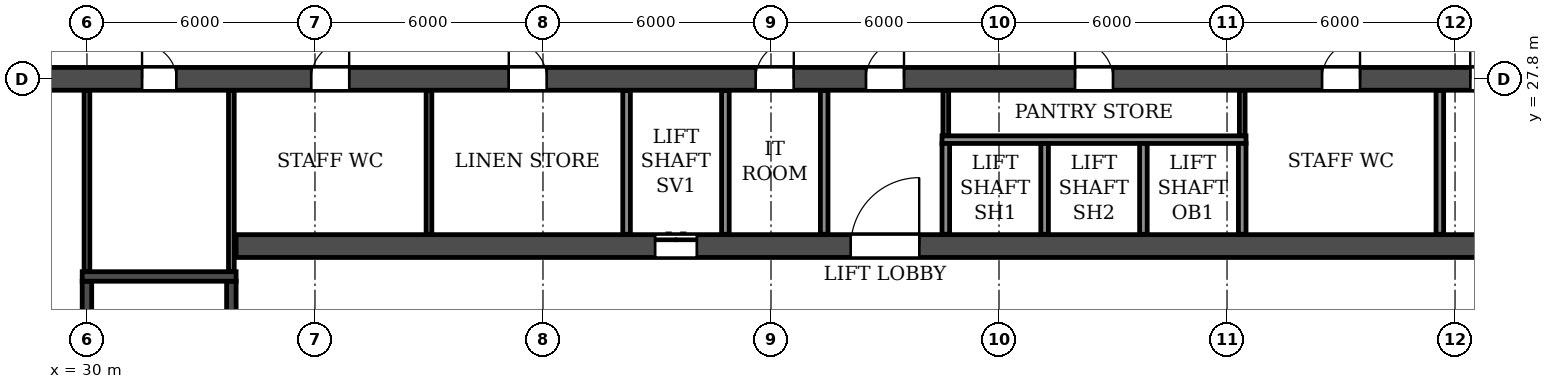
"""IFC4 building model, lengths in metres.
Left out: names, types, materials, properties, quantities, classifications, styles, units other than length and angle.
Written with IfcOpenShell. Run it as: python <this file> out.ifc"""

import sys

from ifc_helpers import new_model, si_unit, direction, frame, frame_2d, origin, place, context, subcontext, project, spatial, rectangle, extrude, element, fill, save


model = new_model("IFC4")
c1 = context("Model", 3, precision=1e-05, world=origin(), true_north=direction((0.0, 1.0)))
c2 = subcontext(c1, "Body", "Model", "MODEL_VIEW")
j1 = project(units=[si_unit("LENGTHUNIT", "METRE"), si_unit("PLANEANGLEUNIT", "RADIAN")], contexts=[c1])
p1 = place(None, origin())
s1 = spatial("IfcSite", under=j1, at=p1, CompositionType="ELEMENT")
p2 = place(p1, origin())
s2 = spatial("IfcBuilding", under=s1, at=p2, CompositionType="ELEMENT")
p3 = place(p2, frame((0.0, 0.0, 63.0)))
s3 = spatial("IfcBuildingStorey", under=s2, at=p3, CompositionType="ELEMENT", Elevation=63.0)
p4 = place(p3, frame((8.6, 27.8, 0.0), z_axis=(0.0, 0.0, 1.0), x_axis=(1.0, 0.0, 0.0)))
e1 = element("IfcWall", 1, at=p4, inside=s3, PredefinedType="SOLIDWALL", context=c2, shape_type="SweptSolid", body=[
    extrude(rectangle(XDim=84.8, YDim=0.6, at=frame_2d((42.4, 0.0))), origin(), (0.0, 0.0, 1.0), 2.95),
])
p5 = place(p4, frame((1.2, 0.0, 0.0)))
e2 = element("IfcOpeningElement", 2, at=p5, cuts=e1, PredefinedType="OPENING", context=c2, shape_type="SweptSolid", body=[
    extrude(rectangle(XDim=1.0, YDim=2.1, at=frame_2d((0.5, 1.05))), frame((0.0, 0.31, 0.0), z_axis=(0.0, -1.0, 0.0), x_axis=(1.0, 0.0, 0.0)), (0.0, 0.0, 1.0), 0.62),
])
p6 = place(p4, frame((5.9, 0.0, 0.0)))
e3 = element("IfcOpeningElement", 3, at=p6, cuts=e1, PredefinedType="OPENING", context=c2, shape_type="SweptSolid", body=[
    extrude(rectangle(XDim=1.0, YDim=2.1, at=frame_2d((0.5, 1.05))), frame((0.0, 0.31, 0.0), z_axis=(0.0, -1.0, 0.0), x_axis=(1.0, 0.0, 0.0)), (0.0, 0.0, 1.0), 0.62),
])
p7 = place(p4, frame((10.3, 0.0, 0.0)))
e4 = element("IfcOpeningElement", 4, at=p7, cuts=e1, PredefinedType="OPENING", context=c2, shape_type="SweptSolid", body=[
    extrude(rectangle(XDim=1.0, YDim=2.1, at=frame_2d((0.5, 1.05))), frame((0.0, 0.31, 0.0), z_axis=(0.0, -1.0, 0.0), x_axis=(1.0, 0.0, 0.0)), (0.0, 0.0, 1.0), 0.62),
])
p8 = place(p4, frame((13.65, 0.0, 0.0)))
e5 = element("IfcOpeningElement", 5, at=p8, cuts=e1, PredefinedType="OPENING", context=c2, shape_type="SweptSolid", body=[
    extrude(rectangle(XDim=0.9, YDim=2.1, at=frame_2d((0.45, 1.05))), frame((0.0, 0.31, 0.0), z_axis=(0.0, -1.0, 0.0), x_axis=(1.0, 0.0, 0.0)), (0.0, 0.0, 1.0), 0.62),
])
p9 = place(p4, frame((22.85, 0.0, 0.0)))
e6 = element("IfcOpeningElement", 6, at=p9, cuts=e1, PredefinedType="OPENING", context=c2, shape_type="SweptSolid", body=[
    extrude(rectangle(XDim=0.9, YDim=2.1, at=frame_2d((0.45, 1.05))), frame((0.0, 0.31, 0.0), z_axis=(0.0, -1.0, 0.0), x_axis=(1.0, 0.0, 0.0)), (0.0, 0.0, 1.0), 0.62),
])
p10 = place(p4, frame((27.3, 0.0, 0.0)))
e7 = element("IfcOpeningElement", 7, at=p10, cuts=e1, PredefinedType="OPENING", context=c2, shape_type="SweptSolid", body=[
    extrude(rectangle(XDim=1.0, YDim=2.1, at=frame_2d((0.5, 1.05))), frame((0.0, 0.31, 0.0), z_axis=(0.0, -1.0, 0.0), x_axis=(1.0, 0.0, 0.0)), (0.0, 0.0, 1.0), 0.62),
])
p11 = place(p4, frame((32.5, 0.0, 0.0)))
e8 = element("IfcOpeningElement", 8, at=p11, cuts=e1, PredefinedType="OPENING", context=c2, shape_type="SweptSolid", body=[
    extrude(rectangle(XDim=1.0, YDim=2.1, at=frame_2d((0.5, 1.05))), frame((0.0, 0.31, 0.0), z_axis=(0.0, -1.0, 0.0), x_axis=(1.0, 0.0, 0.0)), (0.0, 0.0, 1.0), 0.62),
])
p12 = place(p4, frame((39.0, 0.0, 0.0)))
e9 = element("IfcOpeningElement", 9, at=p12, cuts=e1, PredefinedType="OPENING", context=c2, shape_type="SweptSolid", body=[
    extrude(rectangle(XDim=1.0, YDim=2.1, at=frame_2d((0.5, 1.05))), frame((0.0, 0.31, 0.0), z_axis=(0.0, -1.0, 0.0), x_axis=(1.0, 0.0, 0.0)), (0.0, 0.0, 1.0), 0.62),
])
p13 = place(p4, frame((41.9, 0.0, 0.0)))
e10 = element("IfcOpeningElement", 10, at=p13, cuts=e1, PredefinedType="OPENING", context=c2, shape_type="SweptSolid", body=[
    extrude(rectangle(XDim=1.0, YDim=2.1, at=frame_2d((0.5, 1.05))), frame((0.0, 0.31, 0.0), z_axis=(0.0, -1.0, 0.0), x_axis=(1.0, 0.0, 0.0)), (0.0, 0.0, 1.0), 0.62),
])
p14 = place(p4, frame((47.4, 0.0, 0.0)))
e11 = element("IfcOpeningElement", 11, at=p14, cuts=e1, PredefinedType="OPENING", context=c2, shape_type="SweptSolid", body=[
    extrude(rectangle(XDim=1.0, YDim=2.1, at=frame_2d((0.5, 1.05))), frame((0.0, 0.31, 0.0), z_axis=(0.0, -1.0, 0.0), x_axis=(1.0, 0.0, 0.0)), (0.0, 0.0, 1.0), 0.62),
])
p15 = place(p4, frame((53.9, 0.0, 0.0)))
e12 = element("IfcOpeningElement", 12, at=p15, cuts=e1, PredefinedType="OPENING", context=c2, shape_type="SweptSolid", body=[
    extrude(rectangle(XDim=1.0, YDim=2.1, at=frame_2d((0.5, 1.05))), frame((0.0, 0.31, 0.0), z_axis=(0.0, -1.0, 0.0), x_axis=(1.0, 0.0, 0.0)), (0.0, 0.0, 1.0), 0.62),
])
p16 = place(p4, frame((57.8, 0.0, 0.0)))
e13 = element("IfcOpeningElement", 13, at=p16, cuts=e1, PredefinedType="OPENING", context=c2, shape_type="SweptSolid", body=[
    extrude(rectangle(XDim=1.0, YDim=2.1, at=frame_2d((0.5, 1.05))), frame((0.0, 0.31, 0.0), z_axis=(0.0, -1.0, 0.0), x_axis=(1.0, 0.0, 0.0)), (0.0, 0.0, 1.0), 0.62),
])
p17 = place(p4, frame((61.05, 0.0, 0.0)))
e14 = element("IfcOpeningElement", 14, at=p17, cuts=e1, PredefinedType="OPENING", context=c2, shape_type="SweptSolid", body=[
    extrude(rectangle(XDim=0.9, YDim=2.1, at=frame_2d((0.45, 1.05))), frame((0.0, 0.31, 0.0), z_axis=(0.0, -1.0, 0.0), x_axis=(1.0, 0.0, 0.0)), (0.0, 0.0, 1.0), 0.62),
])
p18 = place(p4, frame((70.25, 0.0, 0.0)))
e15 = element("IfcOpeningElement", 15, at=p18, cuts=e1, PredefinedType="OPENING", context=c2, shape_type="SweptSolid", body=[
    extrude(rectangle(XDim=0.9, YDim=2.1, at=frame_2d((0.45, 1.05))), frame((0.0, 0.31, 0.0), z_axis=(0.0, -1.0, 0.0), x_axis=(1.0, 0.0, 0.0)), (0.0, 0.0, 1.0), 0.62),
])
p19 = place(p4, frame((73.5, 0.0, 0.0)))
e16 = element("IfcOpeningElement", 16, at=p19, cuts=e1, PredefinedType="OPENING", context=c2, shape_type="SweptSolid", body=[
    extrude(rectangle(XDim=1.0, YDim=2.1, at=frame_2d((0.5, 1.05))), frame((0.0, 0.31, 0.0), z_axis=(0.0, -1.0, 0.0), x_axis=(1.0, 0.0, 0.0)), (0.0, 0.0, 1.0), 0.62),
])
p20 = place(p4, frame((77.75, 0.0, 0.0)))
e17 = element("IfcOpeningElement", 17, at=p20, cuts=e1, PredefinedType="OPENING", context=c2, shape_type="SweptSolid", body=[
    extrude(rectangle(XDim=1.0, YDim=2.1, at=frame_2d((0.5, 1.05))), frame((0.0, 0.31, 0.0), z_axis=(0.0, -1.0, 0.0), x_axis=(1.0, 0.0, 0.0)), (0.0, 0.0, 1.0), 0.62),
])
p21 = place(p4, frame((82.45, 0.0, 0.0)))
e18 = element("IfcOpeningElement", 18, at=p21, cuts=e1, PredefinedType="OPENING", context=c2, shape_type="SweptSolid", body=[
    extrude(rectangle(XDim=1.0, YDim=2.1, at=frame_2d((0.5, 1.05))), frame((0.0, 0.31, 0.0), z_axis=(0.0, -1.0, 0.0), x_axis=(1.0, 0.0, 0.0)), (0.0, 0.0, 1.0), 0.62),
])
p22 = place(p3, frame((33.925, 23.4, 0.0), z_axis=(0.0, 0.0, 1.0), x_axis=(1.0, 0.0, 0.0)))
e19 = element("IfcWall", 19, at=p22, inside=s3, PredefinedType="SOLIDWALL", context=c2, shape_type="SweptSolid", body=[
    extrude(rectangle(XDim=34.15, YDim=0.6, at=frame_2d((17.075, 0.0))), origin(), (0.0, 0.0, 1.0), 2.95),
])
p23 = place(p22, frame((16.175, 0.0, 0.0)))
e20 = element("IfcOpeningElement", 20, at=p23, cuts=e19, PredefinedType="OPENING", context=c2, shape_type="SweptSolid", body=[
    extrude(rectangle(XDim=1.8, YDim=2.1, at=frame_2d((0.9, 1.05))), frame((0.0, 0.31, 0.0), z_axis=(0.0, -1.0, 0.0), x_axis=(1.0, 0.0, 0.0)), (0.0, 0.0, 1.0), 0.62),
])
p24 = place(p22, frame((11.025, 0.0, 0.0)))
e21 = element("IfcOpeningElement", 21, at=p24, cuts=e19, PredefinedType="OPENING", context=c2, shape_type="SweptSolid", body=[
    extrude(rectangle(XDim=1.1, YDim=2.1, at=frame_2d((0.55, 1.05))), frame((0.0, 0.31, 0.0), z_axis=(0.0, -1.0, 0.0), x_axis=(1.0, 0.0, 0.0)), (0.0, 0.0, 1.0), 0.62),
])
p25 = place(p3, frame((30.0, 14.9, 0.0), z_axis=(0.0, 0.0, 1.0), x_axis=(0.0, 1.0, 0.0)))
e22 = element("IfcWall", 22, at=p25, inside=s3, PredefinedType="SOLIDWALL", context=c2, shape_type="SweptSolid", body=[
    extrude(rectangle(XDim=7.575, YDim=0.25, at=frame_2d((3.788, 0.0))), origin(), (0.0, 0.0, 1.0), 2.95),
])
p26 = place(p3, frame((33.8, 14.9, 0.0), z_axis=(0.0, 0.0, 1.0), x_axis=(0.0, 1.0, 0.0)))
e23 = element("IfcWall", 23, at=p26, inside=s3, PredefinedType="SOLIDWALL", context=c2, shape_type="SweptSolid", body=[
    extrude(rectangle(XDim=7.575, YDim=0.25, at=frame_2d((3.788, 0.0))), origin(), (0.0, 0.0, 1.0), 2.95),
])
p27 = place(p26, frame((0.4, 0.0, 0.0)))
e24 = element("IfcOpeningElement", 24, at=p27, cuts=e23, PredefinedType="OPENING", context=c2, shape_type="SweptSolid", body=[
    extrude(rectangle(XDim=1.0, YDim=2.1, at=frame_2d((0.5, 1.05))), frame((0.0, 0.135, 0.0), z_axis=(0.0, -1.0, 0.0), x_axis=(1.0, 0.0, 0.0)), (0.0, 0.0, 1.0), 0.27),
])
p28 = place(p3, frame((29.875, 22.6, 0.0), z_axis=(0.0, 0.0, 1.0), x_axis=(1.0, 0.0, 0.0)))
e25 = element("IfcWall", 25, at=p28, inside=s3, PredefinedType="SOLIDWALL", context=c2, shape_type="SweptSolid", body=[
    extrude(rectangle(XDim=4.05, YDim=0.25, at=frame_2d((2.025, 0.0))), origin(), (0.0, 0.0, 1.0), 2.95),
])
p29 = place(p3, frame((52.6, 26.3, 0.0), z_axis=(0.0, 0.0, 1.0), x_axis=(0.0, 1.0, 0.0)))
e26 = element("IfcWall", 26, at=p29, inside=s3, PredefinedType="PARTITIONING", context=c2, shape_type="SweptSolid", body=[
    extrude(rectangle(XDim=1.19, YDim=0.15, at=frame_2d((0.595, 0.0))), origin(), (0.0, 0.0, 1.0), 2.95),
])
p30 = place(p3, frame((39.0, 23.71, 0.0), z_axis=(0.0, 0.0, 1.0), x_axis=(0.0, 1.0, 0.0)))
e27 = element("IfcWall", 27, at=p30, inside=s3, PredefinedType="PARTITIONING", context=c2, shape_type="SweptSolid", body=[
    extrude(rectangle(XDim=3.78, YDim=0.15, at=frame_2d((1.89, 0.0))), origin(), (0.0, 0.0, 1.0), 2.95),
])
p31 = place(p3, frame((60.4, 26.3, 0.0), z_axis=(0.0, 0.0, 1.0), x_axis=(0.0, 1.0, 0.0)))
e28 = element("IfcWall", 28, at=p31, inside=s3, PredefinedType="PARTITIONING", context=c2, shape_type="SweptSolid", body=[
    extrude(rectangle(XDim=1.19, YDim=0.15, at=frame_2d((0.595, 0.0))), origin(), (0.0, 0.0, 1.0), 2.95),
])
for number, where, z_axis, x_axis in (
    (29, (49.4, 23.71, 0.0), (0.0, 0.0, 1.0), (0.0, 1.0, 0.0)),
    (30, (65.6, 23.71, 0.0), (0.0, 0.0, 1.0), (0.0, 1.0, 0.0)),
):
    element("IfcWall", number, at=place(p3, frame(where, z_axis=z_axis, x_axis=x_axis)), inside=s3, PredefinedType="PARTITIONING", context=c2, shape_type="SweptSolid", body=[
        extrude(rectangle(XDim=3.78, YDim=0.2, at=frame_2d((1.89, 0.0))), origin(), (0.0, 0.0, 1.0), 2.95),
    ])
for number, where, z_axis, x_axis in (
    (31, (30.0, 22.735, 0.0), (0.0, 0.0, 1.0), (0.0, 1.0, 0.0)),
    (32, (33.8, 22.735, 0.0), (0.0, 0.0, 1.0), (0.0, 1.0, 0.0)),
):
    element("IfcWall", number, at=place(p3, frame(where, z_axis=z_axis, x_axis=x_axis)), inside=s3, PredefinedType="PARTITIONING", context=c2, shape_type="SweptSolid", body=[
        extrude(rectangle(XDim=4.755, YDim=0.15, at=frame_2d((2.377, 0.0))), origin(), (0.0, 0.0, 1.0), 2.95),
    ])
p32 = place(p3, frame((52.5, 26.2, 0.0), z_axis=(0.0, 0.0, 1.0), x_axis=(1.0, 0.0, 0.0)))
e33 = element("IfcWall", 33, at=p32, inside=s3, PredefinedType="PARTITIONING", context=c2, shape_type="SweptSolid", body=[
    extrude(rectangle(XDim=8.0, YDim=0.2, at=frame_2d((4.0, 0.0))), origin(), (0.0, 0.0, 1.0), 2.95),
])
for number, where, z_axis, x_axis in (
    (34, (44.2, 23.71, 0.0), (0.0, 0.0, 1.0), (0.0, 1.0, 0.0)),
    (35, (46.8, 23.71, 0.0), (0.0, 0.0, 1.0), (0.0, 1.0, 0.0)),
):
    element("IfcWall", number, at=place(p3, frame(where, z_axis=z_axis, x_axis=x_axis)), inside=s3, PredefinedType="PARTITIONING", context=c2, shape_type="SweptSolid", body=[
        extrude(rectangle(XDim=3.78, YDim=0.2, at=frame_2d((1.89, 0.0))), origin(), (0.0, 0.0, 1.0), 2.95),
    ])
for number, where, z_axis, x_axis in (
    (36, (52.6, 23.71, 0.0), (0.0, 0.0, 1.0), (0.0, 1.0, 0.0)),
    (37, (55.2, 23.71, 0.0), (0.0, 0.0, 1.0), (0.0, 1.0, 0.0)),
    (38, (57.8, 23.71, 0.0), (0.0, 0.0, 1.0), (0.0, 1.0, 0.0)),
    (39, (60.4, 23.71, 0.0), (0.0, 0.0, 1.0), (0.0, 1.0, 0.0)),
):
    element("IfcWall", number, at=place(p3, frame(where, z_axis=z_axis, x_axis=x_axis)), inside=s3, PredefinedType="PARTITIONING", context=c2, shape_type="SweptSolid", body=[
        extrude(rectangle(XDim=2.39, YDim=0.2, at=frame_2d((1.195, 0.0))), origin(), (0.0, 0.0, 1.0), 2.95),
    ])
p33 = place(p9, origin())
e40 = element("IfcDoor", 40, at=p33, inside=s3, OperationType="SINGLE_SWING_LEFT", PredefinedType="DOOR", context=c2, shape_type="SweptSolid", body=[
    extrude(rectangle(XDim=0.9, YDim=2.1, at=frame_2d((0.45, 1.05))), frame((0.0, 0.025, 0.0), z_axis=(0.0, -1.0, 0.0), x_axis=(1.0, 0.0, 0.0)), (0.0, 0.0, 1.0), 0.05),
])
fill(e6, e40)
p34 = place(p10, origin())
e41 = element("IfcDoor", 41, at=p34, inside=s3, OperationType="SINGLE_SWING_RIGHT", PredefinedType="DOOR", context=c2, shape_type="SweptSolid", body=[
    extrude(rectangle(XDim=1.0, YDim=2.1, at=frame_2d((0.5, 1.05))), frame((0.0, 0.025, 0.0), z_axis=(0.0, -1.0, 0.0), x_axis=(1.0, 0.0, 0.0)), (0.0, 0.0, 1.0), 0.05),
])
fill(e7, e41)
p35 = place(p11, origin())
e42 = element("IfcDoor", 42, at=p35, inside=s3, OperationType="SINGLE_SWING_LEFT", PredefinedType="DOOR", context=c2, shape_type="SweptSolid", body=[
    extrude(rectangle(XDim=1.0, YDim=2.1, at=frame_2d((0.5, 1.05))), frame((0.0, 0.025, 0.0), z_axis=(0.0, -1.0, 0.0), x_axis=(1.0, 0.0, 0.0)), (0.0, 0.0, 1.0), 0.05),
])
fill(e8, e42)
p36 = place(p12, origin())
e43 = element("IfcDoor", 43, at=p36, inside=s3, OperationType="SINGLE_SWING_RIGHT", PredefinedType="DOOR", context=c2, shape_type="SweptSolid", body=[
    extrude(rectangle(XDim=1.0, YDim=2.1, at=frame_2d((0.5, 1.05))), frame((0.0, 0.025, 0.0), z_axis=(0.0, -1.0, 0.0), x_axis=(1.0, 0.0, 0.0)), (0.0, 0.0, 1.0), 0.05),
])
fill(e9, e43)
p37 = place(p13, origin())
e44 = element("IfcDoor", 44, at=p37, inside=s3, OperationType="SINGLE_SWING_RIGHT", PredefinedType="DOOR", context=c2, shape_type="SweptSolid", body=[
    extrude(rectangle(XDim=1.0, YDim=2.1, at=frame_2d((0.5, 1.05))), frame((0.0, 0.025, 0.0), z_axis=(0.0, -1.0, 0.0), x_axis=(1.0, 0.0, 0.0)), (0.0, 0.0, 1.0), 0.05),
])
fill(e10, e44)
p38 = place(p14, origin())
e45 = element("IfcDoor", 45, at=p38, inside=s3, OperationType="SINGLE_SWING_LEFT", PredefinedType="DOOR", context=c2, shape_type="SweptSolid", body=[
    extrude(rectangle(XDim=1.0, YDim=2.1, at=frame_2d((0.5, 1.05))), frame((0.0, 0.025, 0.0), z_axis=(0.0, -1.0, 0.0), x_axis=(1.0, 0.0, 0.0)), (0.0, 0.0, 1.0), 0.05),
])
fill(e11, e45)
p39 = place(p15, origin())
e46 = element("IfcDoor", 46, at=p39, inside=s3, OperationType="SINGLE_SWING_RIGHT", PredefinedType="DOOR", context=c2, shape_type="SweptSolid", body=[
    extrude(rectangle(XDim=1.0, YDim=2.1, at=frame_2d((0.5, 1.05))), frame((0.0, 0.025, 0.0), z_axis=(0.0, -1.0, 0.0), x_axis=(1.0, 0.0, 0.0)), (0.0, 0.0, 1.0), 0.05),
])
fill(e12, e46)
p40 = place(p16, origin())
e47 = element("IfcDoor", 47, at=p40, inside=s3, OperationType="SINGLE_SWING_LEFT", PredefinedType="DOOR", context=c2, shape_type="SweptSolid", body=[
    extrude(rectangle(XDim=1.0, YDim=2.1, at=frame_2d((0.5, 1.05))), frame((0.0, 0.025, 0.0), z_axis=(0.0, -1.0, 0.0), x_axis=(1.0, 0.0, 0.0)), (0.0, 0.0, 1.0), 0.05),
])
fill(e13, e47)
p41 = place(p23, origin())
e48 = element("IfcDoor", 48, at=p41, inside=s3, OperationType="DOUBLE_DOOR_SINGLE_SWING", PredefinedType="DOOR", context=c2, shape_type="SweptSolid", body=[
    extrude(rectangle(XDim=1.8, YDim=2.1, at=frame_2d((0.9, 1.05))), frame((0.0, 0.025, 0.0), z_axis=(0.0, -1.0, 0.0), x_axis=(1.0, 0.0, 0.0)), (0.0, 0.0, 1.0), 0.05),
])
fill(e20, e48)
p42 = place(p24, origin())
e49 = element("IfcDoor", 49, at=p42, inside=s3, OperationType="DOUBLE_DOOR_SLIDING", PredefinedType="DOOR", context=c2, shape_type="SweptSolid", body=[
    extrude(rectangle(XDim=1.1, YDim=2.1, at=frame_2d((0.55, 1.05))), frame((0.0, 0.025, 0.0), z_axis=(0.0, -1.0, 0.0), x_axis=(1.0, 0.0, 0.0)), (0.0, 0.0, 1.0), 0.05),
])
fill(e21, e49)
save(model, sys.argv[1])
